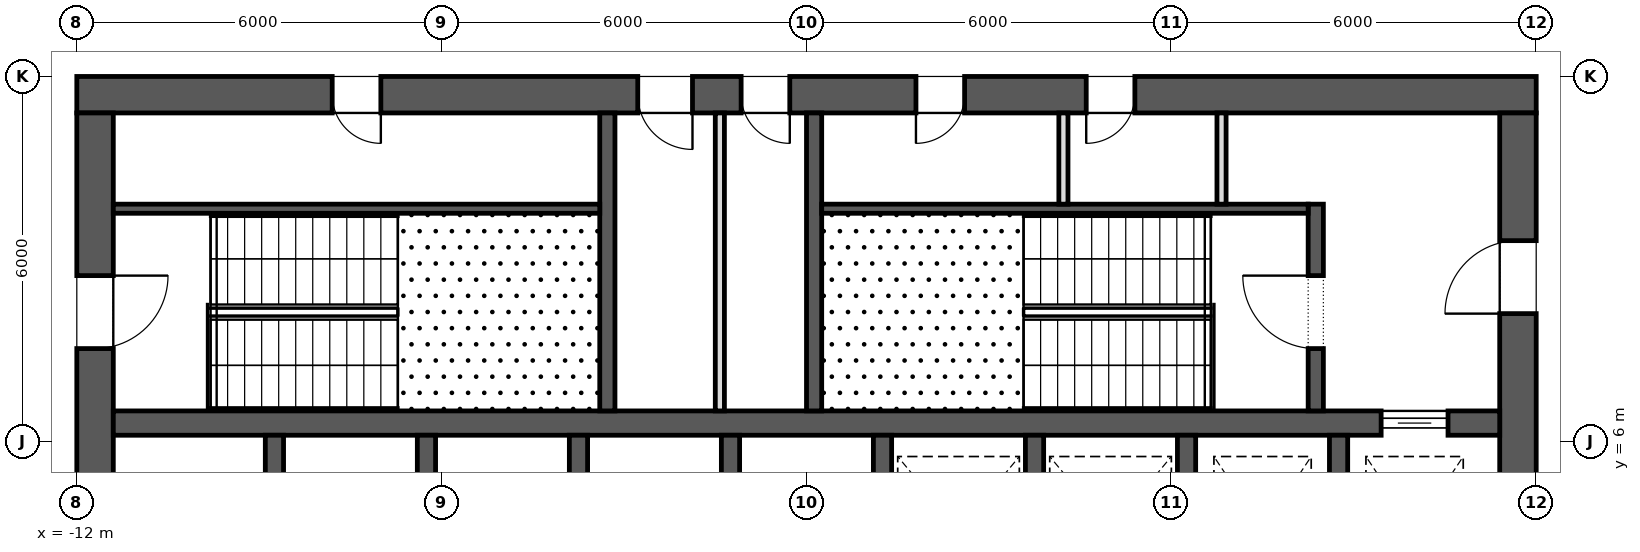
"""IFC4 building model, lengths in metres.
Left out: names, types, materials, properties, quantities, classifications, styles, units other than length and angle.
Written with IfcOpenShell. Run it as: python <this file> out.ifc"""

import sys

from ifc_helpers import new_model, si_unit, direction, frame, frame_2d, origin, place, context, subcontext, project, spatial, rectangle, extrude, element, fill, save


model = new_model("IFC4")
c1 = context("Model", 3, precision=1e-05, world=origin(), true_north=direction((0.0, 1.0)))
c2 = subcontext(c1, "Body", "Model", "MODEL_VIEW")
j1 = project(units=[si_unit("LENGTHUNIT", "METRE"), si_unit("PLANEANGLEUNIT", "RADIAN")], contexts=[c1])
p1 = place(None, origin())
s1 = spatial("IfcSite", under=j1, at=p1, CompositionType="ELEMENT")
p2 = place(p1, origin())
s2 = spatial("IfcBuilding", under=s1, at=p2, CompositionType="ELEMENT")
p3 = place(p2, frame((0.0, 0.0, 142.3)))
s3 = spatial("IfcBuildingStorey", under=s2, at=p3, CompositionType="ELEMENT", Elevation=142.3)
p4 = place(p3, frame((-12.0, 11.7, 0.0), z_axis=(0.0, 0.0, 1.0), x_axis=(1.0, 0.0, 0.0)))
e1 = element("IfcWall", 1, at=p4, inside=s3, PredefinedType="SHEAR", context=c2, shape_type="SweptSolid", body=[
    extrude(rectangle(XDim=24.0, YDim=0.6, at=frame_2d((12.0, 0.0))), origin(), (0.0, 0.0, 1.0), 4.2),
])
p5 = place(p4, frame((9.225, 0.0, 0.0)))
e2 = element("IfcOpeningElement", 2, at=p5, cuts=e1, PredefinedType="OPENING", context=c2, shape_type="SweptSolid", body=[
    extrude(rectangle(XDim=0.9, YDim=2.1, at=frame_2d((0.45, 1.05))), frame((0.0, 0.312, 0.0), z_axis=(0.0, -1.0, 0.0), x_axis=(1.0, 0.0, 0.0)), (0.0, 0.0, 1.0), 0.624),
])
p6 = place(p4, frame((10.925, 0.0, 0.0)))
e3 = element("IfcOpeningElement", 3, at=p6, cuts=e1, PredefinedType="OPENING", context=c2, shape_type="SweptSolid", body=[
    extrude(rectangle(XDim=0.8, YDim=2.1, at=frame_2d((0.4, 1.05))), frame((0.0, 0.312, 0.0), z_axis=(0.0, -1.0, 0.0), x_axis=(1.0, 0.0, 0.0)), (0.0, 0.0, 1.0), 0.624),
])
p7 = place(p4, frame((4.2, 0.0, 0.0)))
e4 = element("IfcOpeningElement", 4, at=p7, cuts=e1, PredefinedType="OPENING", context=c2, shape_type="SweptSolid", body=[
    extrude(rectangle(XDim=0.8, YDim=2.1, at=frame_2d((0.4, 1.05))), frame((0.0, 0.312, 0.0), z_axis=(0.0, -1.0, 0.0), x_axis=(1.0, 0.0, 0.0)), (0.0, 0.0, 1.0), 0.624),
])
p8 = place(p4, frame((13.8, 0.0, 0.0)))
e5 = element("IfcOpeningElement", 5, at=p8, cuts=e1, PredefinedType="OPENING", context=c2, shape_type="SweptSolid", body=[
    extrude(rectangle(XDim=0.8, YDim=2.1, at=frame_2d((0.4, 1.05))), frame((0.0, 0.312, 0.0), z_axis=(0.0, -1.0, 0.0), x_axis=(1.0, 0.0, 0.0)), (0.0, 0.0, 1.0), 0.624),
])
p9 = place(p4, frame((16.6, 0.0, 0.0)))
e6 = element("IfcOpeningElement", 6, at=p9, cuts=e1, PredefinedType="OPENING", context=c2, shape_type="SweptSolid", body=[
    extrude(rectangle(XDim=0.8, YDim=2.1, at=frame_2d((0.4, 1.05))), frame((0.0, 0.312, 0.0), z_axis=(0.0, -1.0, 0.0), x_axis=(1.0, 0.0, 0.0)), (0.0, 0.0, 1.0), 0.624),
])
p10 = place(p3, frame((11.7, -11.4, 0.0), z_axis=(0.0, 0.0, 1.0), x_axis=(0.0, 1.0, 0.0)))
e7 = element("IfcWall", 7, at=p10, inside=s3, PredefinedType="SHEAR", context=c2, shape_type="SweptSolid", body=[
    extrude(rectangle(XDim=22.8, YDim=0.6, at=frame_2d((11.4, 0.0))), origin(), (0.0, 0.0, 1.0), 4.2),
])
p11 = place(p10, frame((10.2, 0.0, 0.0)))
e8 = element("IfcOpeningElement", 8, at=p11, cuts=e7, PredefinedType="OPENING", context=c2, shape_type="SweptSolid", body=[
    extrude(rectangle(XDim=2.4, YDim=2.1, at=frame_2d((1.2, 1.05))), frame((0.0, 0.312, 0.0), z_axis=(0.0, -1.0, 0.0), x_axis=(1.0, 0.0, 0.0)), (0.0, 0.0, 1.0), 0.624),
])
p12 = place(p10, frame((19.5, 0.0, 0.0)))
e9 = element("IfcOpeningElement", 9, at=p12, cuts=e7, PredefinedType="OPENING", context=c2, shape_type="SweptSolid", body=[
    extrude(rectangle(XDim=1.2, YDim=2.1, at=frame_2d((0.6, 1.05))), frame((0.0, 0.312, 0.0), z_axis=(0.0, -1.0, 0.0), x_axis=(1.0, 0.0, 0.0)), (0.0, 0.0, 1.0), 0.624),
])
p13 = place(p10, frame((2.1, 0.0, 0.0)))
e10 = element("IfcOpeningElement", 10, at=p13, cuts=e7, PredefinedType="OPENING", context=c2, shape_type="SweptSolid", body=[
    extrude(rectangle(XDim=1.2, YDim=2.1, at=frame_2d((0.6, 1.05))), frame((0.0, 0.312, 0.0), z_axis=(0.0, -1.0, 0.0), x_axis=(1.0, 0.0, 0.0)), (0.0, 0.0, 1.0), 0.624),
])
p14 = place(p3, frame((-11.7, -11.4, 0.0), z_axis=(0.0, 0.0, 1.0), x_axis=(0.0, 1.0, 0.0)))
e11 = element("IfcWall", 11, at=p14, inside=s3, PredefinedType="SHEAR", context=c2, shape_type="SweptSolid", body=[
    extrude(rectangle(XDim=22.8, YDim=0.6, at=frame_2d((11.4, 0.0))), origin(), (0.0, 0.0, 1.0), 4.2),
])
p15 = place(p14, frame((10.2, 0.0, 0.0)))
e12 = element("IfcOpeningElement", 12, at=p15, cuts=e11, PredefinedType="OPENING", context=c2, shape_type="SweptSolid", body=[
    extrude(rectangle(XDim=2.4, YDim=2.1, at=frame_2d((1.2, 1.05))), frame((0.0, 0.312, 0.0), z_axis=(0.0, -1.0, 0.0), x_axis=(1.0, 0.0, 0.0)), (0.0, 0.0, 1.0), 0.624),
])
p16 = place(p14, frame((18.925, 0.0, 0.0)))
e13 = element("IfcOpeningElement", 13, at=p16, cuts=e11, PredefinedType="OPENING", context=c2, shape_type="SweptSolid", body=[
    extrude(rectangle(XDim=1.2, YDim=2.1, at=frame_2d((0.6, 1.05))), frame((0.0, 0.312, 0.0), z_axis=(0.0, -1.0, 0.0), x_axis=(1.0, 0.0, 0.0)), (0.0, 0.0, 1.0), 0.624),
])
p17 = place(p14, frame((2.675, 0.0, 0.0)))
e14 = element("IfcOpeningElement", 14, at=p17, cuts=e11, PredefinedType="OPENING", context=c2, shape_type="SweptSolid", body=[
    extrude(rectangle(XDim=1.2, YDim=2.1, at=frame_2d((0.6, 1.05))), frame((0.0, 0.312, 0.0), z_axis=(0.0, -1.0, 0.0), x_axis=(1.0, 0.0, 0.0)), (0.0, 0.0, 1.0), 0.624),
])
p18 = place(p3, frame((-11.4, 6.3, 0.0), z_axis=(0.0, 0.0, 1.0), x_axis=(1.0, 0.0, 0.0)))
e15 = element("IfcWall", 15, at=p18, inside=s3, PredefinedType="SHEAR", context=c2, shape_type="SweptSolid", body=[
    extrude(rectangle(XDim=22.8, YDim=0.4, at=frame_2d((11.4, 0.0))), origin(), (0.0, 0.0, 1.0), 4.2),
])
p19 = place(p18, frame((20.85, 0.0, 0.0)))
e16 = element("IfcOpeningElement", 16, at=p19, cuts=e15, PredefinedType="OPENING", context=c2, shape_type="SweptSolid", body=[
    extrude(rectangle(XDim=1.1, YDim=2.1, at=frame_2d((0.55, 1.05))), frame((0.0, 0.212, 0.0), z_axis=(0.0, -1.0, 0.0), x_axis=(1.0, 0.0, 0.0)), (0.0, 0.0, 1.0), 0.424),
])
for number, where, z_axis, x_axis in (
    (17, (-8.75, 3.2, 0.0), (0.0, 0.0, 1.0), (0.0, 1.0, 0.0)),
    (18, (-6.25, 3.2, 0.0), (0.0, 0.0, 1.0), (0.0, 1.0, 0.0)),
    (19, (-3.75, 3.2, 0.0), (0.0, 0.0, 1.0), (0.0, 1.0, 0.0)),
    (20, (-1.25, 3.2, 0.0), (0.0, 0.0, 1.0), (0.0, 1.0, 0.0)),
    (21, (1.25, 3.2, 0.0), (0.0, 0.0, 1.0), (0.0, 1.0, 0.0)),
    (22, (3.75, 3.2, 0.0), (0.0, 0.0, 1.0), (0.0, 1.0, 0.0)),
    (23, (6.25, 3.2, 0.0), (0.0, 0.0, 1.0), (0.0, 1.0, 0.0)),
    (24, (8.75, 3.2, 0.0), (0.0, 0.0, 1.0), (0.0, 1.0, 0.0)),
):
    element("IfcWall", number, at=place(p3, frame(where, z_axis=z_axis, x_axis=x_axis)), inside=s3, PredefinedType="SHEAR", context=c2, shape_type="SweptSolid", body=[
        extrude(rectangle(XDim=2.9, YDim=0.3, at=frame_2d((1.45, 0.0))), origin(), (0.0, 0.0, 1.0), 4.2),
    ])
for number, where, z_axis, x_axis in (
    (25, (-3.275, 6.5, 0.0), (0.0, 0.0, 1.0), (0.0, 1.0, 0.0)),
    (26, (0.125, 6.5, 0.0), (0.0, 0.0, 1.0), (0.0, 1.0, 0.0)),
):
    element("IfcWall", number, at=place(p3, frame(where, z_axis=z_axis, x_axis=x_axis)), inside=s3, PredefinedType="SHEAR", context=c2, shape_type="SweptSolid", body=[
        extrude(rectangle(XDim=4.9, YDim=0.25, at=frame_2d((2.45, 0.0))), origin(), (0.0, 0.0, 1.0), 3.9),
    ])
p20 = place(p3, frame((8.375, 6.5, 0.0), z_axis=(0.0, 0.0, 1.0), x_axis=(0.0, 1.0, 0.0)))
e27 = element("IfcWall", 27, at=p20, inside=s3, PredefinedType="SHEAR", context=c2, shape_type="SweptSolid", body=[
    extrude(rectangle(XDim=3.4, YDim=0.25, at=frame_2d((1.7, 0.0))), origin(), (0.0, 0.0, 1.0), 3.9),
])
p21 = place(p20, frame((1.025, 0.0, 0.0)))
e28 = element("IfcOpeningElement", 28, at=p21, cuts=e27, PredefinedType="OPENING", context=c2, shape_type="SweptSolid", body=[
    extrude(rectangle(XDim=1.2, YDim=2.1, at=frame_2d((0.6, 1.05))), frame((0.0, 0.137, 0.0), z_axis=(0.0, -1.0, 0.0), x_axis=(1.0, 0.0, 0.0)), (0.0, 0.0, 1.0), 0.274),
])
for number, where, z_axis, x_axis in (
    (29, (-11.4, 9.825, 0.0), (0.0, 0.0, 1.0), (1.0, 0.0, 0.0)),
    (30, (0.25, 9.825, 0.0), (0.0, 0.0, 1.0), (1.0, 0.0, 0.0)),
):
    element("IfcWall", number, at=place(p3, frame(where, z_axis=z_axis, x_axis=x_axis)), inside=s3, PredefinedType="SHEAR", context=c2, shape_type="SweptSolid", body=[
        extrude(rectangle(XDim=8.0, YDim=0.15, at=frame_2d((4.0, 0.0))), origin(), (0.0, 0.0, 1.0), 3.9),
    ])
p22 = place(p3, frame((-1.425, 6.5, 0.0), z_axis=(0.0, 0.0, 1.0), x_axis=(0.0, 1.0, 0.0)))
e31 = element("IfcWall", 31, at=p22, inside=s3, PredefinedType="PARTITIONING", context=c2, shape_type="SweptSolid", body=[
    extrude(rectangle(XDim=4.9, YDim=0.15, at=frame_2d((2.45, 0.0))), origin(), (0.0, 0.0, 1.0), 3.9),
])
for number, where, z_axis, x_axis in (
    (32, (4.225, 9.9, 0.0), (0.0, 0.0, 1.0), (0.0, 1.0, 0.0)),
    (33, (6.825, 9.9, 0.0), (0.0, 0.0, 1.0), (0.0, 1.0, 0.0)),
):
    element("IfcWall", number, at=place(p3, frame(where, z_axis=z_axis, x_axis=x_axis)), inside=s3, PredefinedType="PARTITIONING", context=c2, shape_type="SweptSolid", body=[
        extrude(rectangle(XDim=1.5, YDim=0.15, at=frame_2d((0.75, 0.0))), origin(), (0.0, 0.0, 1.0), 3.9),
    ])
p23 = place(p19, origin())
e34 = element("IfcDoor", 34, at=p23, inside=s3, OperationType="SLIDING_TO_LEFT", PredefinedType="DOOR", context=c2, shape_type="SweptSolid", body=[
    extrude(rectangle(XDim=1.1, YDim=2.1, at=frame_2d((0.55, 1.05))), frame((0.0, 0.025, 0.0), z_axis=(0.0, -1.0, 0.0), x_axis=(1.0, 0.0, 0.0)), (0.0, 0.0, 1.0), 0.05),
])
fill(e16, e34)
p24 = place(p16, frame((1.2, 0.0, 0.0), z_axis=(0.0, 0.0, 1.0), x_axis=(-1.0, 0.0, 0.0)))
e35 = element("IfcDoor", 35, at=p24, inside=s3, OperationType="SINGLE_SWING_RIGHT", PredefinedType="DOOR", context=c2, shape_type="SweptSolid", body=[
    extrude(rectangle(XDim=1.2, YDim=2.1, at=frame_2d((0.6, 1.05))), frame((0.0, 0.025, 0.0), z_axis=(0.0, -1.0, 0.0), x_axis=(1.0, 0.0, 0.0)), (0.0, 0.0, 1.0), 0.05),
])
fill(e13, e35)
p25 = place(p21, origin())
e36 = element("IfcDoor", 36, at=p25, inside=s3, OperationType="SINGLE_SWING_LEFT", PredefinedType="DOOR", context=c2, shape_type="SweptSolid", body=[
    extrude(rectangle(XDim=1.2, YDim=2.1, at=frame_2d((0.6, 1.05))), frame((0.0, 0.025, 0.0), z_axis=(0.0, -1.0, 0.0), x_axis=(1.0, 0.0, 0.0)), (0.0, 0.0, 1.0), 0.05),
])
fill(e28, e36)
p26 = place(p12, origin())
e37 = element("IfcDoor", 37, at=p26, inside=s3, OperationType="SINGLE_SWING_RIGHT", PredefinedType="DOOR", context=c2, shape_type="SweptSolid", body=[
    extrude(rectangle(XDim=1.2, YDim=2.1, at=frame_2d((0.6, 1.05))), frame((0.0, 0.025, 0.0), z_axis=(0.0, -1.0, 0.0), x_axis=(1.0, 0.0, 0.0)), (0.0, 0.0, 1.0), 0.05),
])
fill(e9, e37)
p27 = place(p5, frame((0.9, 0.0, 0.0), z_axis=(0.0, 0.0, 1.0), x_axis=(-1.0, 0.0, 0.0)))
e38 = element("IfcDoor", 38, at=p27, inside=s3, OperationType="SINGLE_SWING_RIGHT", PredefinedType="DOOR", context=c2, shape_type="SweptSolid", body=[
    extrude(rectangle(XDim=0.9, YDim=2.1, at=frame_2d((0.45, 1.05))), frame((0.0, 0.025, 0.0), z_axis=(0.0, -1.0, 0.0), x_axis=(1.0, 0.0, 0.0)), (0.0, 0.0, 1.0), 0.05),
])
fill(e2, e38)
p28 = place(p6, frame((0.8, 0.0, 0.0), z_axis=(0.0, 0.0, 1.0), x_axis=(-1.0, 0.0, 0.0)))
e39 = element("IfcDoor", 39, at=p28, inside=s3, OperationType="SINGLE_SWING_RIGHT", PredefinedType="DOOR", context=c2, shape_type="SweptSolid", body=[
    extrude(rectangle(XDim=0.8, YDim=2.1, at=frame_2d((0.4, 1.05))), frame((0.0, 0.025, 0.0), z_axis=(0.0, -1.0, 0.0), x_axis=(1.0, 0.0, 0.0)), (0.0, 0.0, 1.0), 0.05),
])
fill(e3, e39)
p29 = place(p7, frame((0.8, 0.0, 0.0), z_axis=(0.0, 0.0, 1.0), x_axis=(-1.0, 0.0, 0.0)))
e40 = element("IfcDoor", 40, at=p29, inside=s3, OperationType="SINGLE_SWING_RIGHT", PredefinedType="DOOR", context=c2, shape_type="SweptSolid", body=[
    extrude(rectangle(XDim=0.8, YDim=2.1, at=frame_2d((0.4, 1.05))), frame((0.0, 0.025, 0.0), z_axis=(0.0, -1.0, 0.0), x_axis=(1.0, 0.0, 0.0)), (0.0, 0.0, 1.0), 0.05),
])
fill(e4, e40)
p30 = place(p8, frame((0.8, 0.0, 0.0), z_axis=(0.0, 0.0, 1.0), x_axis=(-1.0, 0.0, 0.0)))
e41 = element("IfcDoor", 41, at=p30, inside=s3, OperationType="SINGLE_SWING_LEFT", PredefinedType="DOOR", context=c2, shape_type="SweptSolid", body=[
    extrude(rectangle(XDim=0.8, YDim=2.1, at=frame_2d((0.4, 1.05))), frame((0.0, 0.025, 0.0), z_axis=(0.0, -1.0, 0.0), x_axis=(1.0, 0.0, 0.0)), (0.0, 0.0, 1.0), 0.05),
])
fill(e5, e41)
p31 = place(p9, frame((0.8, 0.0, 0.0), z_axis=(0.0, 0.0, 1.0), x_axis=(-1.0, 0.0, 0.0)))
e42 = element("IfcDoor", 42, at=p31, inside=s3, OperationType="SINGLE_SWING_LEFT", PredefinedType="DOOR", context=c2, shape_type="SweptSolid", body=[
    extrude(rectangle(XDim=0.8, YDim=2.1, at=frame_2d((0.4, 1.05))), frame((0.0, 0.025, 0.0), z_axis=(0.0, -1.0, 0.0), x_axis=(1.0, 0.0, 0.0)), (0.0, 0.0, 1.0), 0.05),
])
fill(e6, e42)
save(model, sys.argv[1])
